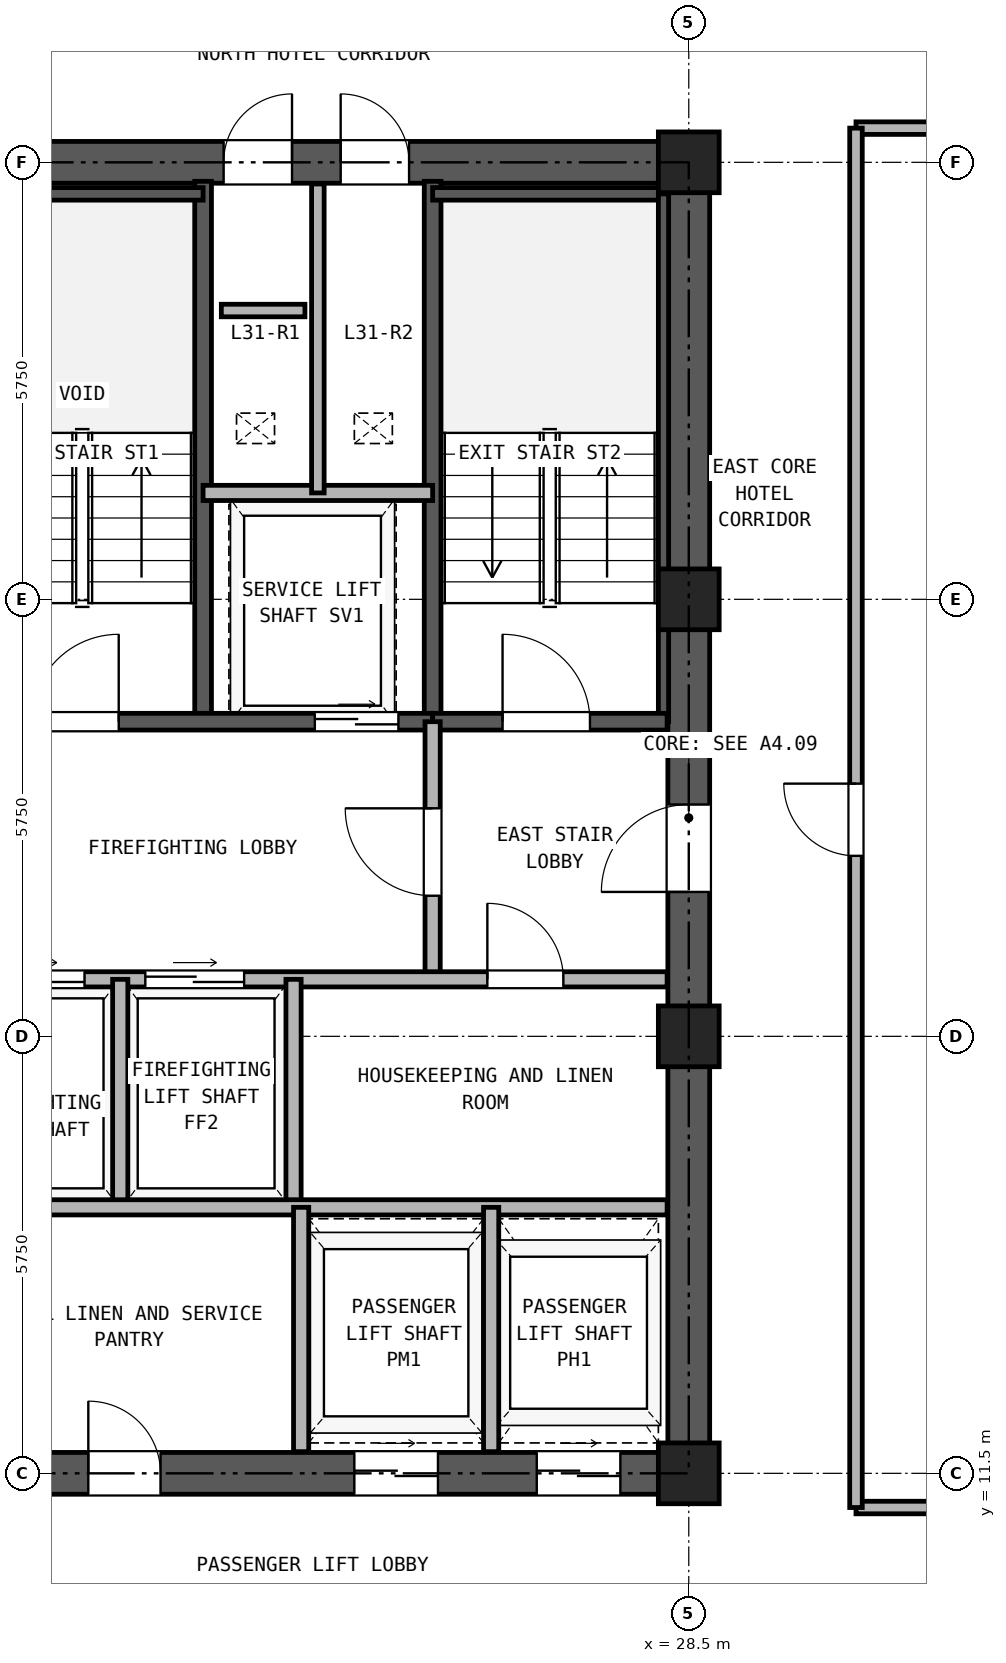
"""IFC4 building model, lengths in metres.
Left out: names, types, materials, properties, quantities, classifications, styles, units other than length and angle.
Written with IfcOpenShell. Run it as: python <this file> out.ifc"""

import sys

from ifc_helpers import new_model, si_unit, direction, frame, frame_2d, origin, origin_2d, place, context, subcontext, project, spatial, rectangle, hollow_rectangle, extrude, source, transform, mapped, element, fill, save


model = new_model("IFC4")
c1 = context("Model", 3, precision=1e-05, world=origin(), true_north=direction((0.0, 1.0)))
c2 = subcontext(c1, "Body", "Model", "MODEL_VIEW")
j1 = project(units=[si_unit("LENGTHUNIT", "METRE"), si_unit("PLANEANGLEUNIT", "RADIAN")], contexts=[c1])
p1 = place(None, origin())
s1 = spatial("IfcSite", under=j1, at=p1, CompositionType="ELEMENT")
p2 = place(p1, origin())
s2 = spatial("IfcBuilding", under=s1, at=p2, CompositionType="ELEMENT")
p3 = place(p2, frame((0.0, 0.0, 115.1)))
s3 = spatial("IfcBuildingStorey", under=s2, at=p3, CompositionType="ELEMENT", Elevation=115.1)
m1 = source(origin(), c2, "Body", "SweptSolid", [
    extrude(hollow_rectangle(XDim=0.8, YDim=0.8, WallThickness=0.045, at=origin_2d()), origin(), (0.0, 0.0, 1.0), 2.95),
])
for number, where, z_axis, x_axis in (
    (1, (28.5, 11.5, 0.0), (0.0, 0.0, 1.0), (1.0, 0.0, 0.0)),
    (2, (28.5, 17.25, 0.0), (0.0, 0.0, 1.0), (1.0, 0.0, 0.0)),
    (3, (28.5, 23.0, 0.0), (0.0, 0.0, 1.0), (1.0, 0.0, 0.0)),
    (4, (28.5, 28.75, 0.0), (0.0, 0.0, 1.0), (1.0, 0.0, 0.0)),
):
    element("IfcColumn", number, at=place(p3, frame(where, z_axis=z_axis, x_axis=x_axis)), inside=s3, PredefinedType="COLUMN", context=c2, shape_type="MappedRepresentation", body=[
        mapped(m1, transform((0.0, 0.0, 0.0), x_axis=(1.0, 0.0, 0.0), y_axis=(0.0, 1.0, 0.0), z_axis=(0.0, 0.0, 1.0), scale=1.0)),
    ])
p4 = place(p3, frame((18.225, 11.5, 0.0), z_axis=(0.0, 0.0, 1.0), x_axis=(1.0, 0.0, 0.0)))
e5 = element("IfcWall", 5, at=p4, inside=s3, PredefinedType="SHEAR", context=c2, shape_type="SweptSolid", body=[
    extrude(rectangle(XDim=10.55, YDim=0.55, at=frame_2d((5.275, 0.0))), origin(), (0.0, 0.0, 1.0), 2.95),
])
p5 = place(p4, frame((2.375, 0.0, 0.0)))
e6 = element("IfcOpeningElement", 6, at=p5, cuts=e5, PredefinedType="OPENING", context=c2, shape_type="SweptSolid", body=[
    extrude(rectangle(XDim=0.95, YDim=2.15, at=frame_2d((0.475, 1.075))), frame((0.0, 0.285, 0.0), z_axis=(0.0, -1.0, 0.0), x_axis=(1.0, 0.0, 0.0)), (0.0, 0.0, 1.0), 0.57),
])
p6 = place(p4, frame((5.875, 0.0, 0.0)))
e7 = element("IfcOpeningElement", 7, at=p6, cuts=e5, PredefinedType="OPENING", context=c2, shape_type="SweptSolid", body=[
    extrude(rectangle(XDim=1.1, YDim=2.25, at=frame_2d((0.55, 1.125))), frame((0.0, 0.285, 0.0), z_axis=(0.0, -1.0, 0.0), x_axis=(1.0, 0.0, 0.0)), (0.0, 0.0, 1.0), 0.57),
])
p7 = place(p4, frame((8.275, 0.0, 0.0)))
e8 = element("IfcOpeningElement", 8, at=p7, cuts=e5, PredefinedType="OPENING", context=c2, shape_type="SweptSolid", body=[
    extrude(rectangle(XDim=1.1, YDim=2.25, at=frame_2d((0.55, 1.125))), frame((0.0, 0.285, 0.0), z_axis=(0.0, -1.0, 0.0), x_axis=(1.0, 0.0, 0.0)), (0.0, 0.0, 1.0), 0.57),
])
p8 = place(p3, frame((18.225, 28.75, 0.0), z_axis=(0.0, 0.0, 1.0), x_axis=(1.0, 0.0, 0.0)))
e9 = element("IfcWall", 9, at=p8, inside=s3, PredefinedType="SHEAR", context=c2, shape_type="SweptSolid", body=[
    extrude(rectangle(XDim=10.55, YDim=0.55, at=frame_2d((5.275, 0.0))), origin(), (0.0, 0.0, 1.0), 2.95),
])
p9 = place(p8, frame((4.155, 0.0, 0.0)))
e10 = element("IfcOpeningElement", 10, at=p9, cuts=e9, PredefinedType="OPENING", context=c2, shape_type="SweptSolid", body=[
    extrude(rectangle(XDim=0.9, YDim=2.05, at=frame_2d((0.45, 1.025))), frame((0.0, 0.285, 0.0), z_axis=(0.0, -1.0, 0.0), x_axis=(1.0, 0.0, 0.0)), (0.0, 0.0, 1.0), 0.57),
])
p10 = place(p8, frame((5.695, 0.0, 0.0)))
e11 = element("IfcOpeningElement", 11, at=p10, cuts=e9, PredefinedType="OPENING", context=c2, shape_type="SweptSolid", body=[
    extrude(rectangle(XDim=0.9, YDim=2.05, at=frame_2d((0.45, 1.025))), frame((0.0, 0.285, 0.0), z_axis=(0.0, -1.0, 0.0), x_axis=(1.0, 0.0, 0.0)), (0.0, 0.0, 1.0), 0.57),
])
p11 = place(p3, frame((28.5, 11.775, 0.0), z_axis=(0.0, 0.0, 1.0), x_axis=(0.0, 1.0, 0.0)))
e12 = element("IfcWall", 12, at=p11, inside=s3, PredefinedType="SHEAR", context=c2, shape_type="SweptSolid", body=[
    extrude(rectangle(XDim=16.7, YDim=0.55, at=frame_2d((8.35, 0.0))), origin(), (0.0, 0.0, 1.0), 2.95),
])
p12 = place(p11, frame((7.375, 0.0, 0.0)))
e13 = element("IfcOpeningElement", 13, at=p12, cuts=e12, PredefinedType="OPENING", context=c2, shape_type="SweptSolid", body=[
    extrude(rectangle(XDim=1.15, YDim=2.2, at=frame_2d((0.575, 1.1))), frame((0.0, 0.285, 0.0), z_axis=(0.0, -1.0, 0.0), x_axis=(1.0, 0.0, 0.0)), (0.0, 0.0, 1.0), 0.57),
])
for number, where, z_axis, x_axis in (
    (14, (22.11, 21.39, 0.0), (0.0, 0.0, 1.0), (0.0, 1.0, 0.0)),
    (15, (25.13, 21.39, 0.0), (0.0, 0.0, 1.0), (0.0, 1.0, 0.0)),
):
    element("IfcWall", number, at=place(p3, frame(where, z_axis=z_axis, x_axis=x_axis)), inside=s3, PredefinedType="SOLIDWALL", context=c2, shape_type="SweptSolid", body=[
        extrude(rectangle(XDim=7.11, YDim=0.22, at=frame_2d((3.555, 0.0))), origin(), (0.0, 0.0, 1.0), 2.95),
    ])
p13 = place(p3, frame((18.785, 28.335, 0.0), z_axis=(0.0, 0.0, 1.0), x_axis=(1.0, 0.0, 0.0)))
e16 = element("IfcWall", 16, at=p13, inside=s3, PredefinedType="PARTITIONING", context=c2, shape_type="SweptSolid", body=[
    extrude(rectangle(XDim=3.325, YDim=0.165, at=frame_2d((1.663, 0.0))), origin(), (0.0, 0.0, 1.0), 2.95),
])
p14 = place(p3, frame((25.13, 28.335, 0.0), z_axis=(0.0, 0.0, 1.0), x_axis=(1.0, 0.0, 0.0)))
e17 = element("IfcWall", 17, at=p14, inside=s3, PredefinedType="PARTITIONING", context=c2, shape_type="SweptSolid", body=[
    extrude(rectangle(XDim=3.085, YDim=0.165, at=frame_2d((1.542, 0.0))), origin(), (0.0, 0.0, 1.0), 2.95),
])
p15 = place(p3, frame((28.167, 21.39, 0.0), z_axis=(0.0, 0.0, 1.0), x_axis=(0.0, 1.0, 0.0)))
e18 = element("IfcWall", 18, at=p15, inside=s3, PredefinedType="PARTITIONING", context=c2, shape_type="SweptSolid", body=[
    extrude(rectangle(XDim=6.945, YDim=0.135, at=frame_2d((3.473, 0.0))), origin(), (0.0, 0.0, 1.0), 2.95),
])
p16 = place(p3, frame((18.785, 21.39, 0.0), z_axis=(0.0, 0.0, 1.0), x_axis=(1.0, 0.0, 0.0)))
e19 = element("IfcWall", 19, at=p16, inside=s3, PredefinedType="SOLIDWALL", context=c2, shape_type="SweptSolid", body=[
    extrude(rectangle(XDim=6.345, YDim=0.22, at=frame_2d((3.172, 0.0))), origin(), (0.0, 0.0, 1.0), 2.95),
])
p17 = place(p16, frame((1.065, 0.0, 0.0)))
e20 = element("IfcOpeningElement", 20, at=p17, cuts=e19, PredefinedType="OPENING", context=c2, shape_type="SweptSolid", body=[
    extrude(rectangle(XDim=1.15, YDim=2.2, at=frame_2d((0.575, 1.1))), frame((0.0, 0.12, 0.0), z_axis=(0.0, -1.0, 0.0), x_axis=(1.0, 0.0, 0.0)), (0.0, 0.0, 1.0), 0.24),
])
p18 = place(p16, frame((4.795, 0.0, 0.0)))
e21 = element("IfcOpeningElement", 21, at=p18, cuts=e19, PredefinedType="OPENING", context=c2, shape_type="SweptSolid", body=[
    extrude(rectangle(XDim=1.1, YDim=2.25, at=frame_2d((0.55, 1.125))), frame((0.0, 0.12, 0.0), z_axis=(0.0, -1.0, 0.0), x_axis=(1.0, 0.0, 0.0)), (0.0, 0.0, 1.0), 0.24),
])
p19 = place(p3, frame((25.13, 21.39, 0.0), z_axis=(0.0, 0.0, 1.0), x_axis=(1.0, 0.0, 0.0)))
e22 = element("IfcWall", 22, at=p19, inside=s3, PredefinedType="SOLIDWALL", context=c2, shape_type="SweptSolid", body=[
    extrude(rectangle(XDim=3.085, YDim=0.22, at=frame_2d((1.542, 0.0))), origin(), (0.0, 0.0, 1.0), 2.95),
])
p20 = place(p19, frame((0.92, 0.0, 0.0)))
e23 = element("IfcOpeningElement", 23, at=p20, cuts=e22, PredefinedType="OPENING", context=c2, shape_type="SweptSolid", body=[
    extrude(rectangle(XDim=1.15, YDim=2.2, at=frame_2d((0.575, 1.1))), frame((0.0, 0.12, 0.0), z_axis=(0.0, -1.0, 0.0), x_axis=(1.0, 0.0, 0.0)), (0.0, 0.0, 1.0), 0.24),
])
p21 = place(p3, frame((22.11, 24.4, 0.0), z_axis=(0.0, 0.0, 1.0), x_axis=(1.0, 0.0, 0.0)))
e24 = element("IfcWall", 24, at=p21, inside=s3, PredefinedType="PARTITIONING", context=c2, shape_type="SweptSolid", body=[
    extrude(rectangle(XDim=3.02, YDim=0.2, at=frame_2d((1.51, 0.0))), origin(), (0.0, 0.0, 1.0), 2.95),
])
p22 = place(p3, frame((23.62, 24.4, 0.0), z_axis=(0.0, 0.0, 1.0), x_axis=(0.0, 1.0, 0.0)))
e25 = element("IfcWall", 25, at=p22, inside=s3, PredefinedType="PARTITIONING", context=c2, shape_type="SweptSolid", body=[
    extrude(rectangle(XDim=4.065, YDim=0.165, at=frame_2d((2.033, 0.0))), origin(), (0.0, 0.0, 1.0), 2.95),
])
p23 = place(p3, frame((25.13, 18.0, 0.0), z_axis=(0.0, 0.0, 1.0), x_axis=(0.0, 1.0, 0.0)))
e26 = element("IfcWall", 26, at=p23, inside=s3, PredefinedType="PARTITIONING", context=c2, shape_type="SweptSolid", body=[
    extrude(rectangle(XDim=3.39, YDim=0.2, at=frame_2d((1.695, 0.0))), origin(), (0.0, 0.0, 1.0), 2.95),
])
p24 = place(p23, frame((1.1, 0.0, 0.0)))
e27 = element("IfcOpeningElement", 27, at=p24, cuts=e26, PredefinedType="OPENING", context=c2, shape_type="SweptSolid", body=[
    extrude(rectangle(XDim=1.15, YDim=2.2, at=frame_2d((0.575, 1.1))), frame((0.0, 0.11, 0.0), z_axis=(0.0, -1.0, 0.0), x_axis=(1.0, 0.0, 0.0)), (0.0, 0.0, 1.0), 0.22),
])
p25 = place(p3, frame((18.785, 18.0, 0.0), z_axis=(0.0, 0.0, 1.0), x_axis=(1.0, 0.0, 0.0)))
e28 = element("IfcWall", 28, at=p25, inside=s3, PredefinedType="PARTITIONING", context=c2, shape_type="SweptSolid", body=[
    extrude(rectangle(XDim=9.43, YDim=0.2, at=frame_2d((4.715, 0.0))), origin(), (0.0, 0.0, 1.0), 2.95),
])
p26 = place(p25, frame((0.465, 0.0, 0.0)))
e29 = element("IfcOpeningElement", 29, at=p26, cuts=e28, PredefinedType="OPENING", context=c2, shape_type="SweptSolid", body=[
    extrude(rectangle(XDim=1.3, YDim=2.3, at=frame_2d((0.65, 1.15))), frame((0.0, 0.11, 0.0), z_axis=(0.0, -1.0, 0.0), x_axis=(1.0, 0.0, 0.0)), (0.0, 0.0, 1.0), 0.22),
])
p27 = place(p25, frame((2.565, 0.0, 0.0)))
e30 = element("IfcOpeningElement", 30, at=p27, cuts=e28, PredefinedType="OPENING", context=c2, shape_type="SweptSolid", body=[
    extrude(rectangle(XDim=1.3, YDim=2.3, at=frame_2d((0.65, 1.15))), frame((0.0, 0.11, 0.0), z_axis=(0.0, -1.0, 0.0), x_axis=(1.0, 0.0, 0.0)), (0.0, 0.0, 1.0), 0.22),
])
p28 = place(p25, frame((7.065, 0.0, 0.0)))
e31 = element("IfcOpeningElement", 31, at=p28, cuts=e28, PredefinedType="OPENING", context=c2, shape_type="SweptSolid", body=[
    extrude(rectangle(XDim=1.0, YDim=2.15, at=frame_2d((0.5, 1.075))), frame((0.0, 0.11, 0.0), z_axis=(0.0, -1.0, 0.0), x_axis=(1.0, 0.0, 0.0)), (0.0, 0.0, 1.0), 0.22),
])
for number, where, z_axis, x_axis in (
    (32, (21.02, 15.0, 0.0), (0.0, 0.0, 1.0), (0.0, 1.0, 0.0)),
    (33, (23.3, 15.0, 0.0), (0.0, 0.0, 1.0), (0.0, 1.0, 0.0)),
):
    element("IfcWall", number, at=place(p3, frame(where, z_axis=z_axis, x_axis=x_axis)), inside=s3, PredefinedType="PARTITIONING", context=c2, shape_type="SweptSolid", body=[
        extrude(rectangle(XDim=3.0, YDim=0.2, at=frame_2d((1.5, 0.0))), origin(), (0.0, 0.0, 1.0), 2.95),
    ])
p29 = place(p3, frame((18.785, 15.0, 0.0), z_axis=(0.0, 0.0, 1.0), x_axis=(1.0, 0.0, 0.0)))
e34 = element("IfcWall", 34, at=p29, inside=s3, PredefinedType="PARTITIONING", context=c2, shape_type="SweptSolid", body=[
    extrude(rectangle(XDim=9.43, YDim=0.2, at=frame_2d((4.715, 0.0))), origin(), (0.0, 0.0, 1.0), 2.95),
])
for number, where, z_axis, x_axis in (
    (35, (23.4, 11.785, 0.0), (0.0, 0.0, 1.0), (0.0, 1.0, 0.0)),
    (36, (25.9, 11.785, 0.0), (0.0, 0.0, 1.0), (0.0, 1.0, 0.0)),
):
    element("IfcWall", number, at=place(p3, frame(where, z_axis=z_axis, x_axis=x_axis)), inside=s3, PredefinedType="PARTITIONING", context=c2, shape_type="SweptSolid", body=[
        extrude(rectangle(XDim=3.215, YDim=0.2, at=frame_2d((1.607, 0.0))), origin(), (0.0, 0.0, 1.0), 2.95),
    ])
for number, where, z_axis, x_axis in (
    (37, (30.7, 11.05, 0.0), (0.0, 0.0, 1.0), (1.0, 0.0, 0.0)),
    (38, (30.7, 29.2, 0.0), (0.0, 0.0, 1.0), (1.0, 0.0, 0.0)),
):
    element("IfcWall", number, at=place(p3, frame(where, z_axis=z_axis, x_axis=x_axis)), inside=s3, PredefinedType="PARTITIONING", context=c2, shape_type="SweptSolid", body=[
        extrude(rectangle(XDim=7.7, YDim=0.165, at=frame_2d((3.85, 0.0))), origin(), (0.0, 0.0, 1.0), 2.95),
    ])
p30 = place(p3, frame((30.7, 11.05, 0.0), z_axis=(0.0, 0.0, 1.0), x_axis=(0.0, 1.0, 0.0)))
e39 = element("IfcWall", 39, at=p30, inside=s3, PredefinedType="PARTITIONING", context=c2, shape_type="SweptSolid", body=[
    extrude(rectangle(XDim=18.15, YDim=0.165, at=frame_2d((9.075, 0.0))), origin(), (0.0, 0.0, 1.0), 2.95),
])
p31 = place(p30, frame((8.575, 0.0, 0.0)))
e40 = element("IfcOpeningElement", 40, at=p31, cuts=e39, PredefinedType="OPENING", context=c2, shape_type="SweptSolid", body=[
    extrude(rectangle(XDim=0.95, YDim=2.15, at=frame_2d((0.475, 1.075))), frame((0.0, 0.093, 0.0), z_axis=(0.0, -1.0, 0.0), x_axis=(1.0, 0.0, 0.0)), (0.0, 0.0, 1.0), 0.185),
])
p32 = place(p3, frame((22.35, 26.8, 0.0), z_axis=(0.0, 0.0, 1.0), x_axis=(1.0, 0.0, 0.0)))
e41 = element("IfcWall", 41, at=p32, inside=s3, PredefinedType="PARTITIONING", context=c2, shape_type="SweptSolid", body=[
    extrude(rectangle(XDim=1.1, YDim=0.165, at=frame_2d((0.55, 0.0))), origin(), (0.0, 0.0, 1.0), 2.95),
])
p33 = place(p17, frame((1.15, 0.0, 0.0), z_axis=(0.0, 0.0, 1.0), x_axis=(-1.0, 0.0, 0.0)))
e42 = element("IfcDoor", 42, at=p33, inside=s3, OperationType="SINGLE_SWING_RIGHT", PredefinedType="DOOR", context=c2, shape_type="SweptSolid", body=[
    extrude(rectangle(XDim=1.15, YDim=2.2, at=frame_2d((0.575, 1.1))), frame((0.0, 0.025, 0.0), z_axis=(0.0, -1.0, 0.0), x_axis=(1.0, 0.0, 0.0)), (0.0, 0.0, 1.0), 0.05),
])
fill(e20, e42)
p34 = place(p20, frame((1.15, 0.0, 0.0), z_axis=(0.0, 0.0, 1.0), x_axis=(-1.0, 0.0, 0.0)))
e43 = element("IfcDoor", 43, at=p34, inside=s3, OperationType="SINGLE_SWING_LEFT", PredefinedType="DOOR", context=c2, shape_type="SweptSolid", body=[
    extrude(rectangle(XDim=1.15, YDim=2.2, at=frame_2d((0.575, 1.1))), frame((0.0, 0.025, 0.0), z_axis=(0.0, -1.0, 0.0), x_axis=(1.0, 0.0, 0.0)), (0.0, 0.0, 1.0), 0.05),
])
fill(e23, e43)
p35 = place(p18, frame((1.1, 0.0, 0.0), z_axis=(0.0, 0.0, 1.0), x_axis=(-1.0, 0.0, 0.0)))
e44 = element("IfcDoor", 44, at=p35, inside=s3, OperationType="DOUBLE_DOOR_SLIDING", PredefinedType="DOOR", context=c2, shape_type="SweptSolid", body=[
    extrude(rectangle(XDim=1.1, YDim=2.25, at=frame_2d((0.55, 1.125))), frame((0.0, 0.025, 0.0), z_axis=(0.0, -1.0, 0.0), x_axis=(1.0, 0.0, 0.0)), (0.0, 0.0, 1.0), 0.05),
])
fill(e21, e44)
p36 = place(p24, origin())
e45 = element("IfcDoor", 45, at=p36, inside=s3, OperationType="SINGLE_SWING_RIGHT", PredefinedType="DOOR", context=c2, shape_type="SweptSolid", body=[
    extrude(rectangle(XDim=1.15, YDim=2.2, at=frame_2d((0.575, 1.1))), frame((0.0, 0.025, 0.0), z_axis=(0.0, -1.0, 0.0), x_axis=(1.0, 0.0, 0.0)), (0.0, 0.0, 1.0), 0.05),
])
fill(e27, e45)
p37 = place(p26, origin())
e46 = element("IfcDoor", 46, at=p37, inside=s3, OperationType="DOUBLE_DOOR_SLIDING", PredefinedType="DOOR", context=c2, shape_type="SweptSolid", body=[
    extrude(rectangle(XDim=1.3, YDim=2.3, at=frame_2d((0.65, 1.15))), frame((0.0, 0.025, 0.0), z_axis=(0.0, -1.0, 0.0), x_axis=(1.0, 0.0, 0.0)), (0.0, 0.0, 1.0), 0.05),
])
fill(e29, e46)
p38 = place(p27, origin())
e47 = element("IfcDoor", 47, at=p38, inside=s3, OperationType="DOUBLE_DOOR_SLIDING", PredefinedType="DOOR", context=c2, shape_type="SweptSolid", body=[
    extrude(rectangle(XDim=1.3, YDim=2.3, at=frame_2d((0.65, 1.15))), frame((0.0, 0.025, 0.0), z_axis=(0.0, -1.0, 0.0), x_axis=(1.0, 0.0, 0.0)), (0.0, 0.0, 1.0), 0.05),
])
fill(e30, e47)
p39 = place(p28, frame((1.0, 0.0, 0.0), z_axis=(0.0, 0.0, 1.0), x_axis=(-1.0, 0.0, 0.0)))
e48 = element("IfcDoor", 48, at=p39, inside=s3, OperationType="SINGLE_SWING_LEFT", PredefinedType="DOOR", context=c2, shape_type="SweptSolid", body=[
    extrude(rectangle(XDim=1.0, YDim=2.15, at=frame_2d((0.5, 1.075))), frame((0.0, 0.025, 0.0), z_axis=(0.0, -1.0, 0.0), x_axis=(1.0, 0.0, 0.0)), (0.0, 0.0, 1.0), 0.05),
])
fill(e31, e48)
p40 = place(p12, origin())
e49 = element("IfcDoor", 49, at=p40, inside=s3, OperationType="SINGLE_SWING_LEFT", PredefinedType="DOOR", context=c2, shape_type="SweptSolid", body=[
    extrude(rectangle(XDim=1.15, YDim=2.2, at=frame_2d((0.575, 1.1))), frame((0.0, 0.025, 0.0), z_axis=(0.0, -1.0, 0.0), x_axis=(1.0, 0.0, 0.0)), (0.0, 0.0, 1.0), 0.05),
])
fill(e13, e49)
p41 = place(p9, origin())
e50 = element("IfcDoor", 50, at=p41, inside=s3, OperationType="SINGLE_SWING_RIGHT", PredefinedType="DOOR", context=c2, shape_type="SweptSolid", body=[
    extrude(rectangle(XDim=0.9, YDim=2.05, at=frame_2d((0.45, 1.025))), frame((0.0, 0.025, 0.0), z_axis=(0.0, -1.0, 0.0), x_axis=(1.0, 0.0, 0.0)), (0.0, 0.0, 1.0), 0.05),
])
fill(e10, e50)
p42 = place(p10, origin())
e51 = element("IfcDoor", 51, at=p42, inside=s3, OperationType="SINGLE_SWING_LEFT", PredefinedType="DOOR", context=c2, shape_type="SweptSolid", body=[
    extrude(rectangle(XDim=0.9, YDim=2.05, at=frame_2d((0.45, 1.025))), frame((0.0, 0.025, 0.0), z_axis=(0.0, -1.0, 0.0), x_axis=(1.0, 0.0, 0.0)), (0.0, 0.0, 1.0), 0.05),
])
fill(e11, e51)
p43 = place(p5, frame((0.95, 0.0, 0.0), z_axis=(0.0, 0.0, 1.0), x_axis=(-1.0, 0.0, 0.0)))
e52 = element("IfcDoor", 52, at=p43, inside=s3, OperationType="SINGLE_SWING_LEFT", PredefinedType="DOOR", context=c2, shape_type="SweptSolid", body=[
    extrude(rectangle(XDim=0.95, YDim=2.15, at=frame_2d((0.475, 1.075))), frame((0.0, 0.025, 0.0), z_axis=(0.0, -1.0, 0.0), x_axis=(1.0, 0.0, 0.0)), (0.0, 0.0, 1.0), 0.05),
])
fill(e6, e52)
p44 = place(p6, frame((1.1, 0.0, 0.0), z_axis=(0.0, 0.0, 1.0), x_axis=(-1.0, 0.0, 0.0)))
e53 = element("IfcDoor", 53, at=p44, inside=s3, OperationType="DOUBLE_DOOR_SLIDING", PredefinedType="DOOR", context=c2, shape_type="SweptSolid", body=[
    extrude(rectangle(XDim=1.1, YDim=2.25, at=frame_2d((0.55, 1.125))), frame((0.0, 0.025, 0.0), z_axis=(0.0, -1.0, 0.0), x_axis=(1.0, 0.0, 0.0)), (0.0, 0.0, 1.0), 0.05),
])
fill(e7, e53)
p45 = place(p7, frame((1.1, 0.0, 0.0), z_axis=(0.0, 0.0, 1.0), x_axis=(-1.0, 0.0, 0.0)))
e54 = element("IfcDoor", 54, at=p45, inside=s3, OperationType="DOUBLE_DOOR_SLIDING", PredefinedType="DOOR", context=c2, shape_type="SweptSolid", body=[
    extrude(rectangle(XDim=1.1, YDim=2.25, at=frame_2d((0.55, 1.125))), frame((0.0, 0.025, 0.0), z_axis=(0.0, -1.0, 0.0), x_axis=(1.0, 0.0, 0.0)), (0.0, 0.0, 1.0), 0.05),
])
fill(e8, e54)
p46 = place(p31, origin())
e55 = element("IfcDoor", 55, at=p46, inside=s3, OperationType="SINGLE_SWING_RIGHT", PredefinedType="DOOR", context=c2, shape_type="SweptSolid", body=[
    extrude(rectangle(XDim=0.95, YDim=2.15, at=frame_2d((0.475, 1.075))), frame((0.0, 0.025, 0.0), z_axis=(0.0, -1.0, 0.0), x_axis=(1.0, 0.0, 0.0)), (0.0, 0.0, 1.0), 0.05),
])
fill(e40, e55)
save(model, sys.argv[1])
